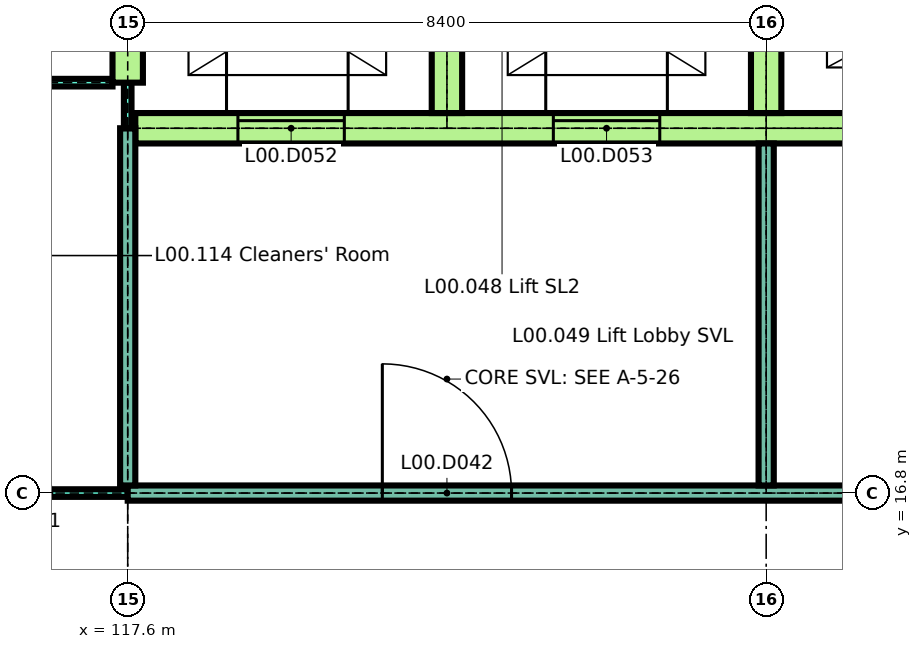
"""IFC4 building model, lengths in metres.
Left out: names, types, materials, properties, quantities, classifications, styles, units other than length and angle.
Written with IfcOpenShell. Run it as: python <this file> out.ifc"""

import sys

from ifc_helpers import new_model, si_unit, direction, frame, frame_2d, origin, place, context, subcontext, project, spatial, rectangle, extrude, element, fill, save


model = new_model("IFC4")
c1 = context("Model", 3, precision=1e-05, world=origin(), true_north=direction((0.0, 1.0)))
c2 = subcontext(c1, "Body", "Model", "MODEL_VIEW")
j1 = project(units=[si_unit("LENGTHUNIT", "METRE"), si_unit("PLANEANGLEUNIT", "RADIAN")], contexts=[c1])
p1 = place(None, origin())
s1 = spatial("IfcSite", under=j1, at=p1, CompositionType="ELEMENT")
p2 = place(p1, origin())
s2 = spatial("IfcBuilding", under=s1, at=p2, CompositionType="ELEMENT")
p3 = place(p2, origin())
s3 = spatial("IfcBuildingStorey", under=s2, at=p3, CompositionType="ELEMENT", Elevation=0.0)
p4 = place(p3, frame((109.65, 16.8, 0.0), z_axis=(0.0, 0.0, 1.0), x_axis=(1.0, 0.0, 0.0)))
e1 = element("IfcWall", 1, at=p4, inside=s3, PredefinedType="PARTITIONING", context=c2, shape_type="SweptSolid", body=[
    extrude(rectangle(XDim=7.95, YDim=0.1, at=frame_2d((3.975, 0.0))), origin(), (0.0, 0.0, 1.0), 4.14),
])
p5 = place(p4, frame((2.9, 0.0, 0.0)))
e2 = element("IfcOpeningElement", 2, at=p5, cuts=e1, PredefinedType="OPENING", context=c2, shape_type="SweptSolid", body=[
    extrude(rectangle(XDim=1.1, YDim=2.1, at=frame_2d((0.55, 1.05))), frame((0.0, 0.06, 0.0), z_axis=(0.0, -1.0, 0.0), x_axis=(1.0, 0.0, 0.0)), (0.0, 0.0, 1.0), 0.12),
])
p6 = place(p4, frame((5.95, 0.0, 0.0)))
e3 = element("IfcOpeningElement", 3, at=p6, cuts=e1, PredefinedType="OPENING", context=c2, shape_type="SweptSolid", body=[
    extrude(rectangle(XDim=1.0, YDim=2.1, at=frame_2d((0.5, 1.05))), frame((0.0, 0.06, 0.0), z_axis=(0.0, -1.0, 0.0), x_axis=(1.0, 0.0, 0.0)), (0.0, 0.0, 1.0), 0.12),
])
p7 = place(p3, frame((117.6, 16.8, 0.0), z_axis=(0.0, 0.0, 1.0), x_axis=(1.0, 0.0, 0.0)))
e4 = element("IfcWall", 4, at=p7, inside=s3, PredefinedType="PARTITIONING", context=c2, shape_type="SweptSolid", body=[
    extrude(rectangle(XDim=25.125, YDim=0.2, at=frame_2d((12.562, 0.0))), origin(), (0.0, 0.0, 1.0), 4.14),
])
p8 = place(p7, frame((3.35, 0.0, 0.0)))
e5 = element("IfcOpeningElement", 5, at=p8, cuts=e4, PredefinedType="OPENING", context=c2, shape_type="SweptSolid", body=[
    extrude(rectangle(XDim=1.7, YDim=2.4, at=frame_2d((0.85, 1.2))), frame((0.0, 0.11, 0.0), z_axis=(0.0, -1.0, 0.0), x_axis=(1.0, 0.0, 0.0)), (0.0, 0.0, 1.0), 0.22),
])
p9 = place(p7, frame((11.75, 0.0, 0.0)))
e6 = element("IfcOpeningElement", 6, at=p9, cuts=e4, PredefinedType="OPENING", context=c2, shape_type="SweptSolid", body=[
    extrude(rectangle(XDim=1.7, YDim=2.4, at=frame_2d((0.85, 1.2))), frame((0.0, 0.11, 0.0), z_axis=(0.0, -1.0, 0.0), x_axis=(1.0, 0.0, 0.0)), (0.0, 0.0, 1.0), 0.22),
])
p10 = place(p3, frame((117.7, 21.6, 0.0), z_axis=(0.0, 0.0, 1.0), x_axis=(1.0, 0.0, 0.0)))
e7 = element("IfcWall", 7, at=p10, inside=s3, PredefinedType="SHEAR", context=c2, shape_type="SweptSolid", body=[
    extrude(rectangle(XDim=24.988, YDim=0.4, at=frame_2d((12.494, 0.0))), origin(), (0.0, 0.0, 1.0), 4.14),
])
p11 = place(p10, frame((1.35, 0.0, 0.0)))
e8 = element("IfcOpeningElement", 8, at=p11, cuts=e7, PredefinedType="OPENING", context=c2, shape_type="SweptSolid", body=[
    extrude(rectangle(XDim=1.4, YDim=2.1, at=frame_2d((0.7, 1.05))), frame((0.0, 0.21, 0.0), z_axis=(0.0, -1.0, 0.0), x_axis=(1.0, 0.0, 0.0)), (0.0, 0.0, 1.0), 0.42),
])
p12 = place(p10, frame((5.5, 0.0, 0.0)))
e9 = element("IfcOpeningElement", 9, at=p12, cuts=e7, PredefinedType="OPENING", context=c2, shape_type="SweptSolid", body=[
    extrude(rectangle(XDim=1.4, YDim=2.1, at=frame_2d((0.7, 1.05))), frame((0.0, 0.21, 0.0), z_axis=(0.0, -1.0, 0.0), x_axis=(1.0, 0.0, 0.0)), (0.0, 0.0, 1.0), 0.42),
])
p13 = place(p10, frame((9.75, 0.0, 0.0)))
e10 = element("IfcOpeningElement", 10, at=p13, cuts=e7, PredefinedType="OPENING", context=c2, shape_type="SweptSolid", body=[
    extrude(rectangle(XDim=1.3, YDim=2.1, at=frame_2d((0.65, 1.05))), frame((0.0, 0.21, 0.0), z_axis=(0.0, -1.0, 0.0), x_axis=(1.0, 0.0, 0.0)), (0.0, 0.0, 1.0), 0.42),
])
p14 = place(p10, frame((13.95, 0.0, 0.0)))
e11 = element("IfcOpeningElement", 11, at=p14, cuts=e7, PredefinedType="OPENING", context=c2, shape_type="SweptSolid", body=[
    extrude(rectangle(XDim=1.3, YDim=2.1, at=frame_2d((0.65, 1.05))), frame((0.0, 0.21, 0.0), z_axis=(0.0, -1.0, 0.0), x_axis=(1.0, 0.0, 0.0)), (0.0, 0.0, 1.0), 0.42),
])
p15 = place(p10, frame((18.25, 0.0, 0.0)))
e12 = element("IfcOpeningElement", 12, at=p15, cuts=e7, PredefinedType="OPENING", context=c2, shape_type="SweptSolid", body=[
    extrude(rectangle(XDim=1.1, YDim=2.1, at=frame_2d((0.55, 1.05))), frame((0.0, 0.21, 0.0), z_axis=(0.0, -1.0, 0.0), x_axis=(1.0, 0.0, 0.0)), (0.0, 0.0, 1.0), 0.42),
])
p16 = place(p10, frame((22.394, 0.0, 0.0)))
e13 = element("IfcOpeningElement", 13, at=p16, cuts=e7, PredefinedType="OPENING", context=c2, shape_type="SweptSolid", body=[
    extrude(rectangle(XDim=1.1, YDim=2.1, at=frame_2d((0.55, 1.05))), frame((0.0, 0.21, 0.0), z_axis=(0.0, -1.0, 0.0), x_axis=(1.0, 0.0, 0.0)), (0.0, 0.0, 1.0), 0.42),
])
p17 = place(p3, frame((100.875, 22.2, 0.0), z_axis=(0.0, 0.0, 1.0), x_axis=(1.0, 0.0, 0.0)))
e14 = element("IfcWall", 14, at=p17, inside=s3, PredefinedType="PARTITIONING", context=c2, shape_type="SweptSolid", body=[
    extrude(rectangle(XDim=16.525, YDim=0.1, at=frame_2d((8.262, 0.0))), origin(), (0.0, 0.0, 1.0), 4.14),
])
p18 = place(p3, frame((117.6, 16.9, 0.0), z_axis=(0.0, 0.0, 1.0), x_axis=(0.0, 1.0, 0.0)))
e15 = element("IfcWall", 15, at=p18, inside=s3, PredefinedType="PARTITIONING", context=c2, shape_type="SweptSolid", body=[
    extrude(rectangle(XDim=4.7, YDim=0.2, at=frame_2d((2.35, 0.0))), origin(), (0.0, 0.0, 1.0), 4.14),
])
p19 = place(p3, frame((117.6, 21.6, 0.0), z_axis=(0.0, 0.0, 1.0), x_axis=(0.0, 1.0, 0.0)))
e16 = element("IfcWall", 16, at=p19, inside=s3, PredefinedType="PARTITIONING", context=c2, shape_type="SweptSolid", body=[
    extrude(rectangle(XDim=0.6, YDim=0.1, at=frame_2d((0.3, 0.0))), origin(), (0.0, 0.0, 1.0), 4.14),
])
p20 = place(p3, frame((117.6, 22.2, 0.0), z_axis=(0.0, 0.0, 1.0), x_axis=(0.0, 1.0, 0.0)))
e17 = element("IfcWall", 17, at=p20, inside=s3, PredefinedType="SHEAR", context=c2, shape_type="SweptSolid", body=[
    extrude(rectangle(XDim=2.8, YDim=0.4, at=frame_2d((1.4, 0.0))), origin(), (0.0, 0.0, 1.0), 4.14),
])
p21 = place(p3, frame((121.8, 21.8, 0.0), z_axis=(0.0, 0.0, 1.0), x_axis=(0.0, 1.0, 0.0)))
e18 = element("IfcWall", 18, at=p21, inside=s3, PredefinedType="SHEAR", context=c2, shape_type="SweptSolid", body=[
    extrude(rectangle(XDim=3.2, YDim=0.4, at=frame_2d((1.6, 0.0))), origin(), (0.0, 0.0, 1.0), 4.14),
])
p22 = place(p3, frame((126.0, 16.9, 0.0), z_axis=(0.0, 0.0, 1.0), x_axis=(0.0, 1.0, 0.0)))
e19 = element("IfcWall", 19, at=p22, inside=s3, PredefinedType="PARTITIONING", context=c2, shape_type="SweptSolid", body=[
    extrude(rectangle(XDim=4.5, YDim=0.2, at=frame_2d((2.25, 0.0))), origin(), (0.0, 0.0, 1.0), 4.14),
])
p23 = place(p3, frame((126.0, 21.8, 0.0), z_axis=(0.0, 0.0, 1.0), x_axis=(0.0, 1.0, 0.0)))
e20 = element("IfcWall", 20, at=p23, inside=s3, PredefinedType="SHEAR", context=c2, shape_type="SweptSolid", body=[
    extrude(rectangle(XDim=3.2, YDim=0.4, at=frame_2d((1.6, 0.0))), origin(), (0.0, 0.0, 1.0), 4.14),
])
p24 = place(p8, origin())
e21 = element("IfcDoor", 21, at=p24, inside=s3, OperationType="SINGLE_SWING_RIGHT", PredefinedType="DOOR", context=c2, shape_type="SweptSolid", body=[
    extrude(rectangle(XDim=1.7, YDim=2.4, at=frame_2d((0.85, 1.2))), frame((0.0, 0.025, 0.0), z_axis=(0.0, -1.0, 0.0), x_axis=(1.0, 0.0, 0.0)), (0.0, 0.0, 1.0), 0.05),
])
fill(e5, e21)
p25 = place(p11, origin())
e22 = element("IfcDoor", 22, at=p25, inside=s3, OperationType="SLIDING_TO_LEFT", PredefinedType="DOOR", context=c2, shape_type="SweptSolid", body=[
    extrude(rectangle(XDim=1.4, YDim=2.1, at=frame_2d((0.7, 1.05))), frame((0.0, 0.025, 0.0), z_axis=(0.0, -1.0, 0.0), x_axis=(1.0, 0.0, 0.0)), (0.0, 0.0, 1.0), 0.05),
])
fill(e8, e22)
p26 = place(p12, origin())
e23 = element("IfcDoor", 23, at=p26, inside=s3, OperationType="SLIDING_TO_LEFT", PredefinedType="DOOR", context=c2, shape_type="SweptSolid", body=[
    extrude(rectangle(XDim=1.4, YDim=2.1, at=frame_2d((0.7, 1.05))), frame((0.0, 0.025, 0.0), z_axis=(0.0, -1.0, 0.0), x_axis=(1.0, 0.0, 0.0)), (0.0, 0.0, 1.0), 0.05),
])
fill(e9, e23)
save(model, sys.argv[1])
